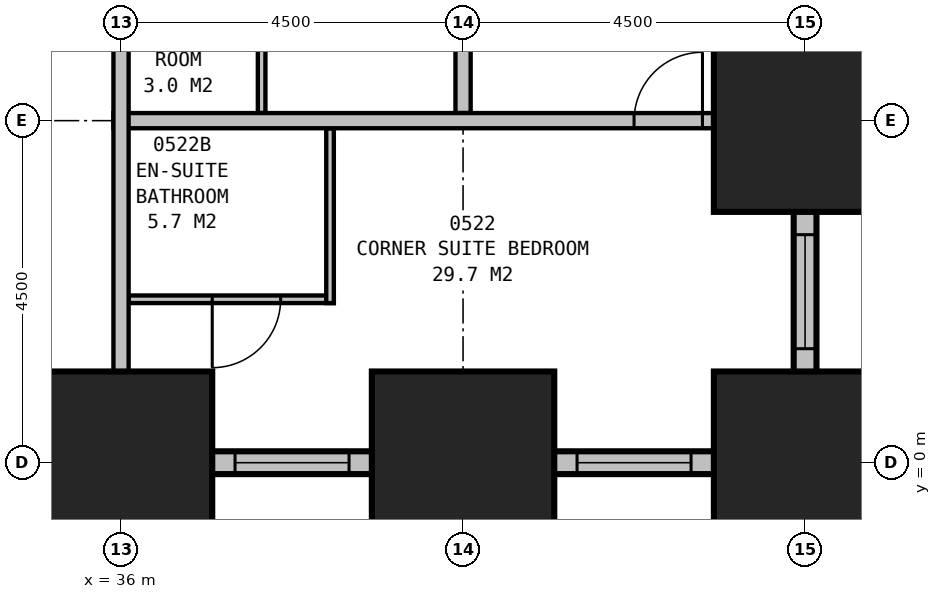
"""IFC4 building model, lengths in metres.
Left out: names, types, materials, properties, quantities, classifications, styles, units other than length and angle.
Written with IfcOpenShell. Run it as: python <this file> out.ifc"""

import sys

from ifc_helpers import new_model, si_unit, direction, frame, frame_2d, origin, origin_2d, place, context, subcontext, project, spatial, rectangle, extrude, element, fill, save


model = new_model("IFC4")
c1 = context("Model", 3, precision=1e-05, world=origin(), true_north=direction((0.0, 1.0)))
c2 = subcontext(c1, "Body", "Model", "MODEL_VIEW")
j1 = project(units=[si_unit("LENGTHUNIT", "METRE"), si_unit("PLANEANGLEUNIT", "RADIAN")], contexts=[c1])
p1 = place(None, origin())
s1 = spatial("IfcSite", under=j1, at=p1, CompositionType="ELEMENT")
p2 = place(p1, origin())
s2 = spatial("IfcBuilding", under=s1, at=p2, CompositionType="ELEMENT")
p3 = place(p2, frame((0.0, 0.0, 29.7)))
s3 = spatial("IfcBuildingStorey", under=s2, at=p3, CompositionType="ELEMENT", Elevation=29.7)
for number, where, z_axis, x_axis in (
    (1, (36.0, 0.0, 0.0), (0.0, 0.0, 1.0), (1.0, 0.0, 0.0)),
    (2, (40.5, 0.0, 0.0), (0.0, 0.0, 1.0), (1.0, 0.0, 0.0)),
    (3, (45.0, 0.0, 0.0), (0.0, 0.0, 1.0), (1.0, 0.0, 0.0)),
    (4, (45.0, 4.5, 0.0), (0.0, 0.0, 1.0), (1.0, 0.0, 0.0)),
):
    element("IfcColumn", number, at=place(p3, frame(where, z_axis=z_axis, x_axis=x_axis)), inside=s3, PredefinedType="COLUMN", context=c2, shape_type="SweptSolid", body=[
        extrude(rectangle(XDim=2.4, YDim=2.4, at=origin_2d()), origin(), (0.0, 0.0, 1.0), 3.5),
    ])
p4 = place(p3, frame((4.35, 0.0, 0.0), z_axis=(0.0, 0.0, 1.0), x_axis=(1.0, 0.0, 0.0)))
e5 = element("IfcWall", 5, at=p4, inside=s3, PredefinedType="STANDARD", context=c2, shape_type="SweptSolid", body=[
    extrude(rectangle(XDim=40.8, YDim=0.3, at=frame_2d((20.4, 0.0))), origin(), (0.0, 0.0, 1.0), 2.05),
])
p5 = place(p4, frame((1.65, 0.0, 0.5)))
e6 = element("IfcOpeningElement", 6, at=p5, cuts=e5, PredefinedType="OPENING", context=c2, shape_type="SweptSolid", body=[
    extrude(rectangle(XDim=1.5, YDim=1.4, at=frame_2d((0.75, 0.7))), frame((0.0, 0.16, 0.0), z_axis=(0.0, -1.0, 0.0), x_axis=(1.0, 0.0, 0.0)), (0.0, 0.0, 1.0), 0.32),
])
p6 = place(p4, frame((6.15, 0.0, 0.5)))
e7 = element("IfcOpeningElement", 7, at=p6, cuts=e5, PredefinedType="OPENING", context=c2, shape_type="SweptSolid", body=[
    extrude(rectangle(XDim=1.5, YDim=1.4, at=frame_2d((0.75, 0.7))), frame((0.0, 0.16, 0.0), z_axis=(0.0, -1.0, 0.0), x_axis=(1.0, 0.0, 0.0)), (0.0, 0.0, 1.0), 0.32),
])
p7 = place(p4, frame((10.65, 0.0, 0.5)))
e8 = element("IfcOpeningElement", 8, at=p7, cuts=e5, PredefinedType="OPENING", context=c2, shape_type="SweptSolid", body=[
    extrude(rectangle(XDim=1.5, YDim=1.4, at=frame_2d((0.75, 0.7))), frame((0.0, 0.16, 0.0), z_axis=(0.0, -1.0, 0.0), x_axis=(1.0, 0.0, 0.0)), (0.0, 0.0, 1.0), 0.32),
])
p8 = place(p4, frame((15.15, 0.0, 0.5)))
e9 = element("IfcOpeningElement", 9, at=p8, cuts=e5, PredefinedType="OPENING", context=c2, shape_type="SweptSolid", body=[
    extrude(rectangle(XDim=1.5, YDim=1.4, at=frame_2d((0.75, 0.7))), frame((0.0, 0.16, 0.0), z_axis=(0.0, -1.0, 0.0), x_axis=(1.0, 0.0, 0.0)), (0.0, 0.0, 1.0), 0.32),
])
p9 = place(p4, frame((19.65, 0.0, 0.5)))
e10 = element("IfcOpeningElement", 10, at=p9, cuts=e5, PredefinedType="OPENING", context=c2, shape_type="SweptSolid", body=[
    extrude(rectangle(XDim=1.5, YDim=1.4, at=frame_2d((0.75, 0.7))), frame((0.0, 0.16, 0.0), z_axis=(0.0, -1.0, 0.0), x_axis=(1.0, 0.0, 0.0)), (0.0, 0.0, 1.0), 0.32),
])
p10 = place(p4, frame((24.15, 0.0, 0.5)))
e11 = element("IfcOpeningElement", 11, at=p10, cuts=e5, PredefinedType="OPENING", context=c2, shape_type="SweptSolid", body=[
    extrude(rectangle(XDim=1.5, YDim=1.4, at=frame_2d((0.75, 0.7))), frame((0.0, 0.16, 0.0), z_axis=(0.0, -1.0, 0.0), x_axis=(1.0, 0.0, 0.0)), (0.0, 0.0, 1.0), 0.32),
])
p11 = place(p4, frame((28.65, 0.0, 0.5)))
e12 = element("IfcOpeningElement", 12, at=p11, cuts=e5, PredefinedType="OPENING", context=c2, shape_type="SweptSolid", body=[
    extrude(rectangle(XDim=1.5, YDim=1.4, at=frame_2d((0.75, 0.7))), frame((0.0, 0.16, 0.0), z_axis=(0.0, -1.0, 0.0), x_axis=(1.0, 0.0, 0.0)), (0.0, 0.0, 1.0), 0.32),
])
p12 = place(p4, frame((33.15, 0.0, 0.5)))
e13 = element("IfcOpeningElement", 13, at=p12, cuts=e5, PredefinedType="OPENING", context=c2, shape_type="SweptSolid", body=[
    extrude(rectangle(XDim=1.5, YDim=1.4, at=frame_2d((0.75, 0.7))), frame((0.0, 0.16, 0.0), z_axis=(0.0, -1.0, 0.0), x_axis=(1.0, 0.0, 0.0)), (0.0, 0.0, 1.0), 0.32),
])
p13 = place(p4, frame((37.65, 0.0, 0.5)))
e14 = element("IfcOpeningElement", 14, at=p13, cuts=e5, PredefinedType="OPENING", context=c2, shape_type="SweptSolid", body=[
    extrude(rectangle(XDim=1.5, YDim=1.4, at=frame_2d((0.75, 0.7))), frame((0.0, 0.16, 0.0), z_axis=(0.0, -1.0, 0.0), x_axis=(1.0, 0.0, 0.0)), (0.0, 0.0, 1.0), 0.32),
])
p14 = place(p3, frame((45.0, -0.15, 0.0), z_axis=(0.0, 0.0, 1.0), x_axis=(0.0, 1.0, 0.0)))
e15 = element("IfcWall", 15, at=p14, inside=s3, PredefinedType="STANDARD", context=c2, shape_type="SweptSolid", body=[
    extrude(rectangle(XDim=4.8, YDim=0.3, at=frame_2d((2.4, 0.0))), origin(), (0.0, 0.0, 1.0), 2.05),
])
p15 = place(p14, frame((1.65, 0.0, 0.5)))
e16 = element("IfcOpeningElement", 16, at=p15, cuts=e15, PredefinedType="OPENING", context=c2, shape_type="SweptSolid", body=[
    extrude(rectangle(XDim=1.5, YDim=1.4, at=frame_2d((0.75, 0.7))), frame((0.0, 0.16, 0.0), z_axis=(0.0, -1.0, 0.0), x_axis=(1.0, 0.0, 0.0)), (0.0, 0.0, 1.0), 0.32),
])
p16 = place(p3, frame((44.85, 4.5, 0.0), z_axis=(0.0, 0.0, 1.0), x_axis=(1.0, 0.0, 0.0)))
e17 = element("IfcWall", 17, at=p16, inside=s3, PredefinedType="STANDARD", context=c2, shape_type="SweptSolid", body=[
    extrude(rectangle(XDim=4.3, YDim=0.3, at=frame_2d((2.15, 0.0))), origin(), (0.0, 0.0, 1.0), 2.05),
])
p17 = place(p16, frame((1.55, 0.0, 0.5)))
e18 = element("IfcOpeningElement", 18, at=p17, cuts=e17, PredefinedType="OPENING", context=c2, shape_type="SweptSolid", body=[
    extrude(rectangle(XDim=1.2, YDim=1.4, at=frame_2d((0.6, 0.7))), frame((0.0, 0.16, 0.0), z_axis=(0.0, -1.0, 0.0), x_axis=(1.0, 0.0, 0.0)), (0.0, 0.0, 1.0), 0.32),
])
p18 = place(p3, frame((49.017, 4.351, 0.0), z_axis=(0.0, 0.0, 1.0), x_axis=(-0.110433201132, 0.993883548555, 0.0)))
e19 = element("IfcWall", 19, at=p18, inside=s3, PredefinedType="STANDARD", context=c2, shape_type="SweptSolid", body=[
    extrude(rectangle(XDim=31.994, YDim=0.3, at=frame_2d((15.997, 0.0))), origin(), (0.0, 0.0, 1.0), 2.05),
])
p19 = place(p18, frame((1.664, 0.0, 0.5)))
e20 = element("IfcOpeningElement", 20, at=p19, cuts=e19, PredefinedType="OPENING", context=c2, shape_type="SweptSolid", body=[
    extrude(rectangle(XDim=1.5, YDim=1.4, at=frame_2d((0.75, 0.7))), frame((0.0, 0.16, 0.0), z_axis=(0.0, -1.0, 0.0), x_axis=(1.0, 0.0, 0.0)), (0.0, 0.0, 1.0), 0.32),
])
p20 = place(p18, frame((6.192, 0.0, 0.5)))
e21 = element("IfcOpeningElement", 21, at=p20, cuts=e19, PredefinedType="OPENING", context=c2, shape_type="SweptSolid", body=[
    extrude(rectangle(XDim=1.5, YDim=1.4, at=frame_2d((0.75, 0.7))), frame((0.0, 0.16, 0.0), z_axis=(0.0, -1.0, 0.0), x_axis=(1.0, 0.0, 0.0)), (0.0, 0.0, 1.0), 0.32),
])
p21 = place(p18, frame((10.719, 0.0, 0.5)))
e22 = element("IfcOpeningElement", 22, at=p21, cuts=e19, PredefinedType="OPENING", context=c2, shape_type="SweptSolid", body=[
    extrude(rectangle(XDim=1.5, YDim=1.4, at=frame_2d((0.75, 0.7))), frame((0.0, 0.16, 0.0), z_axis=(0.0, -1.0, 0.0), x_axis=(1.0, 0.0, 0.0)), (0.0, 0.0, 1.0), 0.32),
])
p22 = place(p18, frame((15.247, 0.0, 0.5)))
e23 = element("IfcOpeningElement", 23, at=p22, cuts=e19, PredefinedType="OPENING", context=c2, shape_type="SweptSolid", body=[
    extrude(rectangle(XDim=1.5, YDim=1.4, at=frame_2d((0.75, 0.7))), frame((0.0, 0.16, 0.0), z_axis=(0.0, -1.0, 0.0), x_axis=(1.0, 0.0, 0.0)), (0.0, 0.0, 1.0), 0.32),
])
p23 = place(p18, frame((19.775, 0.0, 0.5)))
e24 = element("IfcOpeningElement", 24, at=p23, cuts=e19, PredefinedType="OPENING", context=c2, shape_type="SweptSolid", body=[
    extrude(rectangle(XDim=1.5, YDim=1.4, at=frame_2d((0.75, 0.7))), frame((0.0, 0.16, 0.0), z_axis=(0.0, -1.0, 0.0), x_axis=(1.0, 0.0, 0.0)), (0.0, 0.0, 1.0), 0.32),
])
p24 = place(p18, frame((24.302, 0.0, 0.5)))
e25 = element("IfcOpeningElement", 25, at=p24, cuts=e19, PredefinedType="OPENING", context=c2, shape_type="SweptSolid", body=[
    extrude(rectangle(XDim=1.5, YDim=1.4, at=frame_2d((0.75, 0.7))), frame((0.0, 0.16, 0.0), z_axis=(0.0, -1.0, 0.0), x_axis=(1.0, 0.0, 0.0)), (0.0, 0.0, 1.0), 0.32),
])
p25 = place(p18, frame((28.83, 0.0, 0.5)))
e26 = element("IfcOpeningElement", 26, at=p25, cuts=e19, PredefinedType="OPENING", context=c2, shape_type="SweptSolid", body=[
    extrude(rectangle(XDim=1.5, YDim=1.4, at=frame_2d((0.75, 0.7))), frame((0.0, 0.16, 0.0), z_axis=(0.0, -1.0, 0.0), x_axis=(1.0, 0.0, 0.0)), (0.0, 0.0, 1.0), 0.32),
])
p26 = place(p3, frame((36.0, 11.2, 0.0), z_axis=(0.0, 0.0, 1.0), x_axis=(0.0, -1.0, 0.0)))
e27 = element("IfcWall", 27, at=p26, inside=s3, PredefinedType="PARTITIONING", context=c2, shape_type="SweptSolid", body=[
    extrude(rectangle(XDim=11.2, YDim=0.2, at=frame_2d((5.6, 0.0))), origin(), (0.0, 0.0, 1.0), 2.25),
])
p27 = place(p3, frame((35.9, 4.5, 0.0), z_axis=(0.0, 0.0, 1.0), x_axis=(1.0, 0.0, 0.0)))
e28 = element("IfcWall", 28, at=p27, inside=s3, PredefinedType="PARTITIONING", context=c2, shape_type="SweptSolid", body=[
    extrude(rectangle(XDim=9.1, YDim=0.2, at=frame_2d((4.55, 0.0))), origin(), (0.0, 0.0, 1.0), 3.25),
])
p28 = place(p27, frame((6.85, 0.0, 0.0)))
e29 = element("IfcOpeningElement", 29, at=p28, cuts=e28, PredefinedType="OPENING", context=c2, shape_type="SweptSolid", body=[
    extrude(rectangle(XDim=0.9, YDim=2.1, at=frame_2d((0.45, 1.05))), frame((0.0, 0.11, 0.0), z_axis=(0.0, -1.0, 0.0), x_axis=(1.0, 0.0, 0.0)), (0.0, 0.0, 1.0), 0.22),
])
p29 = place(p3, frame((40.5, 4.6, 0.0), z_axis=(0.0, 0.0, 1.0), x_axis=(0.0, 1.0, 0.0)))
e30 = element("IfcWall", 30, at=p29, inside=s3, PredefinedType="PARTITIONING", context=c2, shape_type="SweptSolid", body=[
    extrude(rectangle(XDim=8.8, YDim=0.2, at=frame_2d((4.4, 0.0))), origin(), (0.0, 0.0, 1.0), 2.25),
])
p30 = place(p29, frame((4.05, 0.0, 0.0)))
e31 = element("IfcOpeningElement", 31, at=p30, cuts=e30, PredefinedType="OPENING", context=c2, shape_type="SweptSolid", body=[
    extrude(rectangle(XDim=0.9, YDim=2.1, at=frame_2d((0.45, 1.05))), frame((0.0, 0.11, 0.0), z_axis=(0.0, -1.0, 0.0), x_axis=(1.0, 0.0, 0.0)), (0.0, 0.0, 1.0), 0.22),
])
p31 = place(p3, frame((37.85, 4.6, 0.0), z_axis=(0.0, 0.0, 1.0), x_axis=(0.0, 1.0, 0.0)))
e32 = element("IfcWall", 32, at=p31, inside=s3, PredefinedType="PLUMBINGWALL", context=c2, shape_type="SweptSolid", body=[
    extrude(rectangle(XDim=2.0, YDim=0.1, at=frame_2d((1.0, 0.0))), origin(), (0.0, 0.0, 1.0), 3.25),
])
p32 = place(p3, frame((38.75, 4.4, 0.0), z_axis=(0.0, 0.0, 1.0), x_axis=(0.0, -1.0, 0.0)))
e33 = element("IfcWall", 33, at=p32, inside=s3, PredefinedType="PLUMBINGWALL", context=c2, shape_type="SweptSolid", body=[
    extrude(rectangle(XDim=2.3, YDim=0.1, at=frame_2d((1.15, 0.0))), origin(), (0.0, 0.0, 1.0), 3.25),
])
p33 = place(p3, frame((36.1, 2.15, 0.0), z_axis=(0.0, 0.0, 1.0), x_axis=(1.0, 0.0, 0.0)))
e34 = element("IfcWall", 34, at=p33, inside=s3, PredefinedType="PLUMBINGWALL", context=c2, shape_type="SweptSolid", body=[
    extrude(rectangle(XDim=2.7, YDim=0.1, at=frame_2d((1.35, 0.0))), origin(), (0.0, 0.0, 1.0), 3.25),
])
p34 = place(p33, frame((2.0, 0.0, 0.0), z_axis=(0.0, 0.0, 1.0), x_axis=(-1.0, 0.0, 0.0)))
e35 = element("IfcOpeningElement", 35, at=p34, cuts=e34, PredefinedType="OPENING", context=c2, shape_type="SweptSolid", body=[
    extrude(rectangle(XDim=0.9, YDim=2.1, at=frame_2d((0.45, 1.05))), frame((0.0, 0.06, 0.0), z_axis=(0.0, -1.0, 0.0), x_axis=(1.0, 0.0, 0.0)), (0.0, 0.0, 1.0), 0.12),
])
p35 = place(p12, origin())
e36 = element("IfcWindow", 36, at=p35, inside=s3, PartitioningType="SINGLE_PANEL", PredefinedType="WINDOW", context=c2, shape_type="SweptSolid", body=[
    extrude(rectangle(XDim=1.5, YDim=1.4, at=frame_2d((0.75, 0.7))), frame((0.0, 0.03, 0.0), z_axis=(0.0, -1.0, 0.0), x_axis=(1.0, 0.0, 0.0)), (0.0, 0.0, 1.0), 0.06),
])
fill(e13, e36)
p36 = place(p13, origin())
e37 = element("IfcWindow", 37, at=p36, inside=s3, PartitioningType="SINGLE_PANEL", PredefinedType="WINDOW", context=c2, shape_type="SweptSolid", body=[
    extrude(rectangle(XDim=1.5, YDim=1.4, at=frame_2d((0.75, 0.7))), frame((0.0, 0.03, 0.0), z_axis=(0.0, -1.0, 0.0), x_axis=(1.0, 0.0, 0.0)), (0.0, 0.0, 1.0), 0.06),
])
fill(e14, e37)
p37 = place(p15, origin())
e38 = element("IfcWindow", 38, at=p37, inside=s3, PartitioningType="SINGLE_PANEL", PredefinedType="WINDOW", context=c2, shape_type="SweptSolid", body=[
    extrude(rectangle(XDim=1.5, YDim=1.4, at=frame_2d((0.75, 0.7))), frame((0.0, 0.03, 0.0), z_axis=(0.0, -1.0, 0.0), x_axis=(1.0, 0.0, 0.0)), (0.0, 0.0, 1.0), 0.06),
])
fill(e16, e38)
p38 = place(p28, origin())
e39 = element("IfcDoor", 39, at=p38, inside=s3, OperationType="SINGLE_SWING_RIGHT", PredefinedType="DOOR", context=c2, shape_type="SweptSolid", body=[
    extrude(rectangle(XDim=0.9, YDim=2.1, at=frame_2d((0.45, 1.05))), frame((0.0, 0.025, 0.0), z_axis=(0.0, -1.0, 0.0), x_axis=(1.0, 0.0, 0.0)), (0.0, 0.0, 1.0), 0.05),
])
fill(e29, e39)
p39 = place(p34, origin())
e40 = element("IfcDoor", 40, at=p39, inside=s3, OperationType="SINGLE_SWING_RIGHT", PredefinedType="DOOR", context=c2, shape_type="SweptSolid", body=[
    extrude(rectangle(XDim=0.9, YDim=2.1, at=frame_2d((0.45, 1.05))), frame((0.0, 0.025, 0.0), z_axis=(0.0, -1.0, 0.0), x_axis=(1.0, 0.0, 0.0)), (0.0, 0.0, 1.0), 0.05),
])
fill(e35, e40)
save(model, sys.argv[1])
